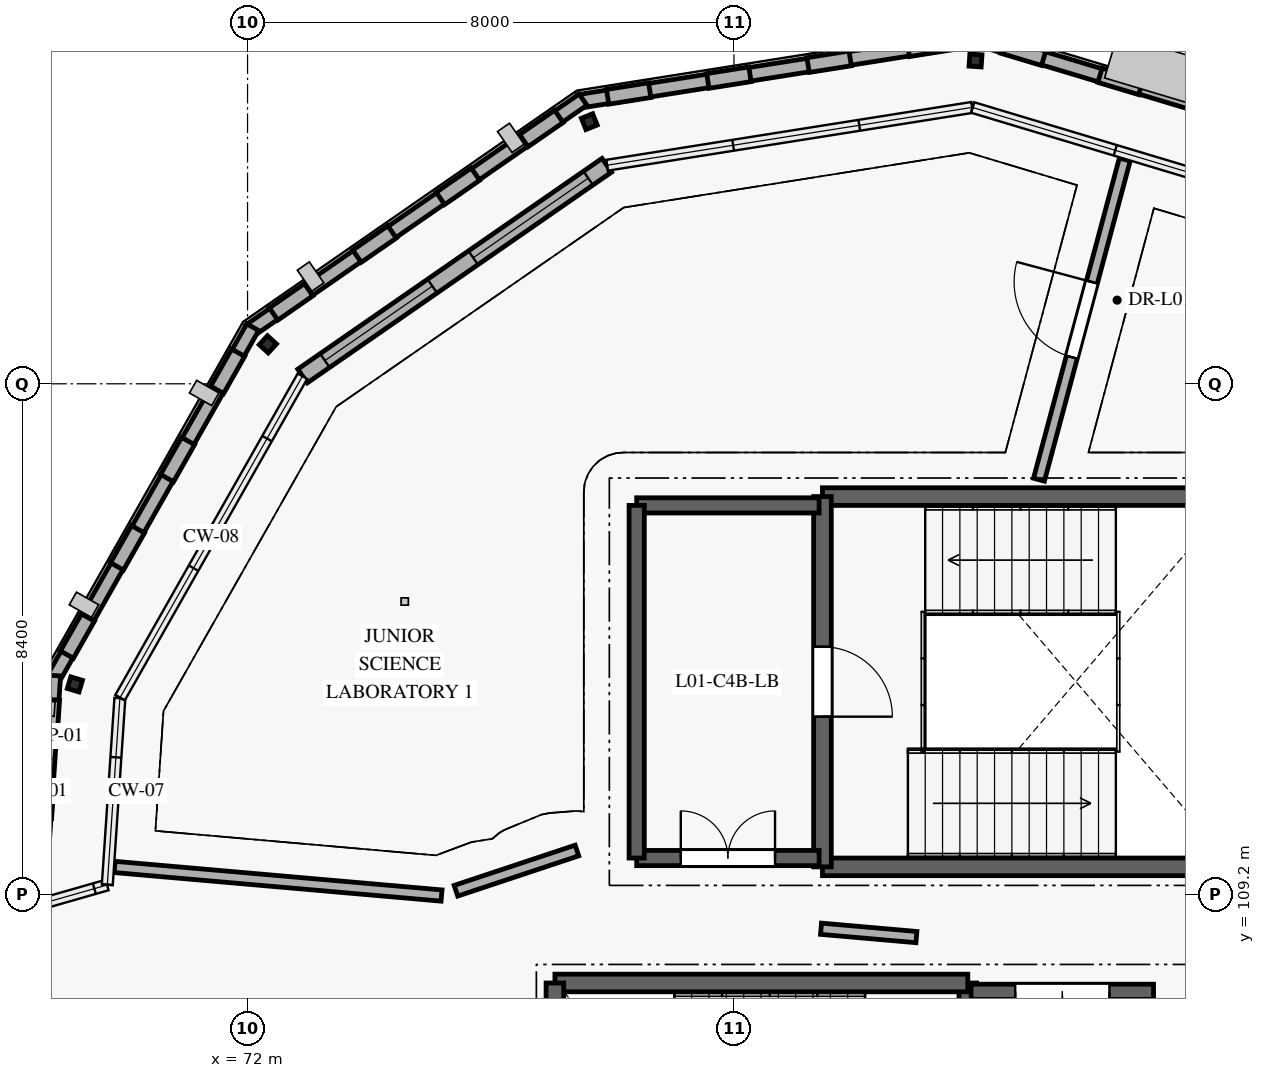
"""IFC4 building model, lengths in metres.
Left out: names, types, materials, properties, quantities, classifications, styles, units other than length and angle.
Written with IfcOpenShell. Run it as: python <this file> out.ifc"""

import sys

from ifc_helpers import new_model, si_unit, direction, frame, frame_2d, origin, origin_2d, place, context, subcontext, project, spatial, rectangle, hollow_rectangle, extrude, element, fill, save


model = new_model("IFC4")
c1 = context("Model", 3, precision=1e-05, world=origin(), true_north=direction((0.0, 1.0)))
c2 = subcontext(c1, "Body", "Model", "MODEL_VIEW")
j1 = project(units=[si_unit("LENGTHUNIT", "METRE"), si_unit("PLANEANGLEUNIT", "RADIAN")], contexts=[c1])
p1 = place(None, origin())
s1 = spatial("IfcSite", under=j1, at=p1, CompositionType="ELEMENT")
p2 = place(p1, origin())
s2 = spatial("IfcBuilding", under=s1, at=p2, CompositionType="ELEMENT")
p3 = place(p2, frame((0.0, 0.0, 4.2)))
s3 = spatial("IfcBuildingStorey", under=s2, at=p3, CompositionType="ELEMENT", Elevation=4.2)
for number, where, z_axis, x_axis in (
    (1, (83.972, 122.917, 0.0), (0.0, 0.0, 1.0), (-0.998, 0.067, 0.0)),
    (2, (77.62, 121.911, 0.0), (0.0, 0.0, 1.0), (-0.928, -0.372, 0.0)),
    (3, (72.334, 118.249, 0.0), (0.0, 0.0, 1.0), (-0.675, -0.738, 0.0)),
    (4, (69.16, 112.656, 0.0), (0.0, 0.0, 1.0), (-0.288, -0.958, 0.0)),
):
    element("IfcColumn", number, at=place(p3, frame(where, z_axis=z_axis, x_axis=x_axis)), inside=s3, PredefinedType="COLUMN", context=c2, shape_type="SweptSolid", body=[
        extrude(hollow_rectangle(XDim=0.2, YDim=0.2, WallThickness=0.012, InnerFilletRadius=0.012, OuterFilletRadius=0.019, at=origin_2d()), origin(), (0.0, 0.0, 1.0), 4.2),
    ])
p4 = place(p3, frame((72.905, 117.728, 0.0), z_axis=(0.0, 0.0, 1.0), x_axis=(0.821994314634, 0.569495695075, 0.0)))
e5 = element("IfcWall", 5, at=p4, inside=s3, PredefinedType="SOLIDWALL", context=c2, shape_type="SweptSolid", body=[
    extrude(rectangle(XDim=6.087, YDim=0.275, at=frame_2d((3.043, 0.0))), origin(), (0.0, 0.0, 1.0), 3.94),
])
p5 = place(p4, frame((0.447, 0.0, 0.85)))
e6 = element("IfcOpeningElement", 6, at=p5, cuts=e5, PredefinedType="OPENING", context=c2, shape_type="SweptSolid", body=[
    extrude(rectangle(XDim=2.15, YDim=1.4, at=frame_2d((1.075, 0.7))), frame((0.0, 0.147, 0.0), z_axis=(0.0, -1.0, 0.0), x_axis=(1.0, 0.0, 0.0)), (0.0, 0.0, 1.0), 0.295),
])
p6 = place(p4, frame((3.415, 0.0, 0.85)))
e7 = element("IfcOpeningElement", 7, at=p6, cuts=e5, PredefinedType="OPENING", context=c2, shape_type="SweptSolid", body=[
    extrude(rectangle(XDim=2.3, YDim=1.4, at=frame_2d((1.15, 0.7))), frame((0.0, 0.147, 0.0), z_axis=(0.0, -1.0, 0.0), x_axis=(1.0, 0.0, 0.0)), (0.0, 0.0, 1.0), 0.295),
])
p7 = place(p3, frame((90.351, 121.374, 0.0), z_axis=(0.0, 0.0, 1.0), x_axis=(-0.957749751871, 0.287602873404, 0.0)))
e8 = element("IfcWall", 8, at=p7, inside=s3, PredefinedType="ELEMENTEDWALL", context=c2, shape_type="SweptSolid", body=[
    extrude(rectangle(XDim=6.676, YDim=0.225, at=frame_2d((3.338, 0.0))), origin(), (0.0, 0.0, 1.0), 1.09),
])
for number, where, z_axis, x_axis in (
    (9, (86.69, 122.473, 1.09), (0.0, 0.0, 1.0), (-0.958, 0.287, 0.0)),
    (10, (85.092, 122.953, 1.09), (0.0, 0.0, 1.0), (-0.958, 0.287, 0.0)),
):
    element("IfcWall", number, at=place(p3, frame(where, z_axis=z_axis, x_axis=x_axis)), inside=s3, PredefinedType="ELEMENTEDWALL", context=c2, shape_type="SweptSolid", body=[
        extrude(rectangle(XDim=0.701, YDim=0.245, at=frame_2d((0.351, 0.0))), origin(), (0.0, 0.0, 1.0), 2.85),
    ])
p8 = place(p3, frame((84.037, 123.288, 0.0), z_axis=(0.0, 0.0, 1.0), x_axis=(-0.987690206406, -0.156422684322, 0.0)))
e11 = element("IfcWall", 11, at=p8, inside=s3, PredefinedType="ELEMENTEDWALL", context=c2, shape_type="SweptSolid", body=[
    extrude(rectangle(XDim=6.676, YDim=0.225, at=frame_2d((3.338, 0.0))), origin(), (0.0, 0.0, 1.0), 1.09),
])
for number, where, z_axis, x_axis in (
    (12, (83.559, 123.212, 1.09), (0.0, 0.0, 1.0), (-0.988, -0.156, 0.0)),
    (13, (81.911, 122.951, 1.09), (0.0, 0.0, 1.0), (-0.988, -0.156, 0.0)),
    (14, (80.262, 122.69, 1.09), (0.0, 0.0, 1.0), (-0.988, -0.156, 0.0)),
    (15, (78.614, 122.429, 1.09), (0.0, 0.0, 1.0), (-0.988, -0.156, 0.0)),
):
    element("IfcWall", number, at=place(p3, frame(where, z_axis=z_axis, x_axis=x_axis)), inside=s3, PredefinedType="ELEMENTEDWALL", context=c2, shape_type="SweptSolid", body=[
        extrude(rectangle(XDim=0.701, YDim=0.245, at=frame_2d((0.351, 0.0))), origin(), (0.0, 0.0, 1.0), 2.85),
    ])
p9 = place(p3, frame((77.518, 122.274, 0.0), z_axis=(0.0, 0.0, 1.0), x_axis=(-0.822009139105, -0.56947429725, 0.0)))
e16 = element("IfcWall", 16, at=p9, inside=s3, PredefinedType="ELEMENTEDWALL", context=c2, shape_type="SweptSolid", body=[
    extrude(rectangle(XDim=6.676, YDim=0.225, at=frame_2d((3.338, 0.0))), origin(), (0.0, 0.0, 1.0), 1.09),
])
for number, where, z_axis, x_axis in (
    (17, (77.12, 121.998, 1.09), (0.0, 0.0, 1.0), (-0.822, -0.569, 0.0)),
    (18, (75.748, 121.048, 1.09), (0.0, 0.0, 1.0), (-0.822, -0.569, 0.0)),
):
    element("IfcWall", number, at=place(p3, frame(where, z_axis=z_axis, x_axis=x_axis)), inside=s3, PredefinedType="ELEMENTEDWALL", context=c2, shape_type="SweptSolid", body=[
        extrude(rectangle(XDim=0.701, YDim=0.245, at=frame_2d((0.351, 0.0))), origin(), (0.0, 0.0, 1.0), 2.85),
    ])
p10 = place(p3, frame((74.377, 120.097, 1.09), z_axis=(0.0, 0.0, 1.0), x_axis=(-0.821953993254, -0.569553889438, 0.0)))
e19 = element("IfcWall", 19, at=p10, inside=s3, PredefinedType="ELEMENTEDWALL", context=c2, shape_type="SweptSolid", body=[
    extrude(rectangle(XDim=0.701, YDim=0.245, at=frame_2d((0.351, 0.0))), origin(), (0.0, 0.0, 1.0), 2.85),
])
p11 = place(p3, frame((73.005, 119.147, 1.09), z_axis=(0.0, 0.0, 1.0), x_axis=(-0.822004061083, -0.569481627064, 0.0)))
e20 = element("IfcWall", 20, at=p11, inside=s3, PredefinedType="ELEMENTEDWALL", context=c2, shape_type="SweptSolid", body=[
    extrude(rectangle(XDim=0.701, YDim=0.245, at=frame_2d((0.351, 0.0))), origin(), (0.0, 0.0, 1.0), 2.85),
])
p12 = place(p3, frame((72.085, 118.531, 0.0), z_axis=(0.0, 0.0, 1.0), x_axis=(-0.493497861667, -0.869747009498, 0.0)))
e21 = element("IfcWall", 21, at=p12, inside=s3, PredefinedType="ELEMENTEDWALL", context=c2, shape_type="SweptSolid", body=[
    extrude(rectangle(XDim=6.676, YDim=0.225, at=frame_2d((3.338, 0.0))), origin(), (0.0, 0.0, 1.0), 1.09),
])
for number, where, z_axis, x_axis in (
    (22, (71.846, 118.11, 1.09), (0.0, 0.0, 1.0), (-0.494, -0.87, 0.0)),
    (23, (71.022, 116.659, 1.09), (0.0, 0.0, 1.0), (-0.493, -0.87, 0.0)),
    (24, (70.199, 115.207, 1.09), (0.0, 0.0, 1.0), (-0.494, -0.87, 0.0)),
):
    element("IfcWall", number, at=place(p3, frame(where, z_axis=z_axis, x_axis=x_axis)), inside=s3, PredefinedType="ELEMENTEDWALL", context=c2, shape_type="SweptSolid", body=[
        extrude(rectangle(XDim=0.701, YDim=0.245, at=frame_2d((0.351, 0.0))), origin(), (0.0, 0.0, 1.0), 2.85),
    ])
p13 = place(p3, frame((69.375, 113.756, 1.09), z_axis=(0.0, 0.0, 1.0), x_axis=(-0.49339908657, -0.869803047461, 0.0)))
e25 = element("IfcWall", 25, at=p13, inside=s3, PredefinedType="ELEMENTEDWALL", context=c2, shape_type="SweptSolid", body=[
    extrude(rectangle(XDim=0.701, YDim=0.245, at=frame_2d((0.351, 0.0))), origin(), (0.0, 0.0, 1.0), 2.85),
])
p14 = place(p3, frame((68.813, 112.802, 0.0), z_axis=(0.0, 0.0, 1.0), x_axis=(-0.067209356194, -0.997738894922, 0.0)))
e26 = element("IfcWall", 26, at=p14, inside=s3, PredefinedType="ELEMENTEDWALL", context=c2, shape_type="SweptSolid", body=[
    extrude(rectangle(XDim=2.746, YDim=0.225, at=frame_2d((1.373, 0.0))), origin(), (0.0, 0.0, 1.0), 1.09),
])
p15 = place(p3, frame((68.787, 112.405, 1.09), z_axis=(0.0, 0.0, 1.0), x_axis=(-0.067277250526, -0.997734319126, 0.0)))
e27 = element("IfcWall", 27, at=p15, inside=s3, PredefinedType="ELEMENTEDWALL", context=c2, shape_type="SweptSolid", body=[
    extrude(rectangle(XDim=0.577, YDim=0.245, at=frame_2d((0.289, 0.0))), origin(), (0.0, 0.0, 1.0), 2.85),
])
p16 = place(p3, frame((68.694, 111.035, 1.09), z_axis=(0.0, 0.0, 1.0), x_axis=(-0.066827806151, -0.997764523485, 0.0)))
e28 = element("IfcWall", 28, at=p16, inside=s3, PredefinedType="ELEMENTEDWALL", context=c2, shape_type="SweptSolid", body=[
    extrude(rectangle(XDim=0.577, YDim=0.245, at=frame_2d((0.289, 0.0))), origin(), (0.0, 0.0, 1.0), 2.85),
])
p17 = place(p3, frame((83.845, 101.655, 0.0), z_axis=(0.0, 0.0, 1.0), x_axis=(0.0, 1.0, 0.0)))
e29 = element("IfcWall", 29, at=p17, inside=s3, PredefinedType="SHEAR", context=c2, shape_type="SweptSolid", body=[
    extrude(rectangle(XDim=6.09, YDim=0.29, at=frame_2d((3.045, 0.0))), origin(), (0.0, 0.0, 1.0), 3.95),
])
p18 = place(p17, frame((2.47, 0.0, 0.0)))
e30 = element("IfcOpeningElement", 30, at=p18, cuts=e29, PredefinedType="OPENING", context=c2, shape_type="SweptSolid", body=[
    extrude(rectangle(XDim=1.15, YDim=2.1, at=frame_2d((0.575, 1.05))), frame((0.0, 0.155, 0.0), z_axis=(0.0, -1.0, 0.0), x_axis=(1.0, 0.0, 0.0)), (0.0, 0.0, 1.0), 0.31),
])
p19 = place(p3, frame((83.845, 107.745, 0.0), z_axis=(0.0, 0.0, 1.0), x_axis=(-1.0, 0.0, 0.0)))
e31 = element("IfcWall", 31, at=p19, inside=s3, PredefinedType="SHEAR", context=c2, shape_type="SweptSolid", body=[
    extrude(rectangle(XDim=6.79, YDim=0.29, at=frame_2d((3.395, 0.0))), origin(), (0.0, 0.0, 1.0), 3.95),
])
p20 = place(p3, frame((77.055, 107.745, 0.0), z_axis=(0.0, 0.0, 1.0), x_axis=(0.0, -1.0, 0.0)))
e32 = element("IfcWall", 32, at=p20, inside=s3, PredefinedType="SHEAR", context=c2, shape_type="SweptSolid", body=[
    extrude(rectangle(XDim=6.09, YDim=0.29, at=frame_2d((3.045, 0.0))), origin(), (0.0, 0.0, 1.0), 3.95),
])
p21 = place(p3, frame((86.9, 107.6, 0.0), z_axis=(0.0, 0.0, 1.0), x_axis=(-1.0, 0.0, 0.0)))
e33 = element("IfcWall", 33, at=p21, inside=s3, PredefinedType="SHEAR", context=c2, shape_type="SweptSolid", body=[
    extrude(rectangle(XDim=3.0, YDim=0.25, at=frame_2d((1.5, 0.0))), origin(), (0.0, 0.0, 1.0), 3.95),
])
p22 = place(p21, frame((0.725, 0.0, 0.0)))
e34 = element("IfcOpeningElement", 34, at=p22, cuts=e33, PredefinedType="OPENING", context=c2, shape_type="SweptSolid", body=[
    extrude(rectangle(XDim=1.55, YDim=2.15, at=frame_2d((0.775, 1.075))), frame((0.0, 0.135, 0.0), z_axis=(0.0, -1.0, 0.0), x_axis=(1.0, 0.0, 0.0)), (0.0, 0.0, 1.0), 0.27),
])
for number, where, z_axis, x_axis in (
    (35, (81.455, 109.655, 0.0), (0.0, 0.0, 1.0), (1.0, 0.0, 0.0)),
    (36, (88.245, 115.745, 0.0), (0.0, 0.0, 1.0), (-1.0, 0.0, 0.0)),
):
    element("IfcWall", number, at=place(p3, frame(where, z_axis=z_axis, x_axis=x_axis)), inside=s3, PredefinedType="SHEAR", context=c2, shape_type="SweptSolid", body=[
        extrude(rectangle(XDim=6.79, YDim=0.29, at=frame_2d((3.395, 0.0))), origin(), (0.0, 0.0, 1.0), 3.95),
    ])
p23 = place(p3, frame((81.455, 115.745, 0.0), z_axis=(0.0, 0.0, 1.0), x_axis=(0.0, -1.0, 0.0)))
e37 = element("IfcWall", 37, at=p23, inside=s3, PredefinedType="SHEAR", context=c2, shape_type="SweptSolid", body=[
    extrude(rectangle(XDim=6.09, YDim=0.29, at=frame_2d((3.045, 0.0))), origin(), (0.0, 0.0, 1.0), 3.95),
])
p24 = place(p23, frame((2.47, 0.0, 0.0)))
e38 = element("IfcOpeningElement", 38, at=p24, cuts=e37, PredefinedType="OPENING", context=c2, shape_type="SweptSolid", body=[
    extrude(rectangle(XDim=1.15, YDim=2.1, at=frame_2d((0.575, 1.05))), frame((0.0, 0.155, 0.0), z_axis=(0.0, -1.0, 0.0), x_axis=(1.0, 0.0, 0.0)), (0.0, 0.0, 1.0), 0.31),
])
p25 = place(p3, frame((78.4, 109.8, 0.0), z_axis=(0.0, 0.0, 1.0), x_axis=(1.0, 0.0, 0.0)))
e39 = element("IfcWall", 39, at=p25, inside=s3, PredefinedType="SHEAR", context=c2, shape_type="SweptSolid", body=[
    extrude(rectangle(XDim=3.0, YDim=0.25, at=frame_2d((1.5, 0.0))), origin(), (0.0, 0.0, 1.0), 3.95),
])
p26 = place(p25, frame((0.725, 0.0, 0.0)))
e40 = element("IfcOpeningElement", 40, at=p26, cuts=e39, PredefinedType="OPENING", context=c2, shape_type="SweptSolid", body=[
    extrude(rectangle(XDim=1.55, YDim=2.15, at=frame_2d((0.775, 1.075))), frame((0.0, 0.135, 0.0), z_axis=(0.0, -1.0, 0.0), x_axis=(1.0, 0.0, 0.0)), (0.0, 0.0, 1.0), 0.27),
])
p27 = place(p3, frame((81.4, 115.6, 0.0), z_axis=(0.0, 0.0, 1.0), x_axis=(-1.0, 0.0, 0.0)))
e41 = element("IfcWall", 41, at=p27, inside=s3, PredefinedType="SHEAR", context=c2, shape_type="SweptSolid", body=[
    extrude(rectangle(XDim=3.0, YDim=0.25, at=frame_2d((1.5, 0.0))), origin(), (0.0, 0.0, 1.0), 3.95),
])
p28 = place(p3, frame((78.4, 115.6, 0.0), z_axis=(0.0, 0.0, 1.0), x_axis=(0.0, -1.0, 0.0)))
e42 = element("IfcWall", 42, at=p28, inside=s3, PredefinedType="SHEAR", context=c2, shape_type="SweptSolid", body=[
    extrude(rectangle(XDim=5.8, YDim=0.25, at=frame_2d((2.9, 0.0))), origin(), (0.0, 0.0, 1.0), 3.95),
])
p29 = place(p3, frame((81.431, 108.637, 0.0), z_axis=(0.0, 0.0, 1.0), x_axis=(0.996196241539, -0.08713809926, 0.0)))
e43 = element("IfcWall", 43, at=p29, inside=s3, PredefinedType="PARTITIONING", context=c2, shape_type="SweptSolid", body=[
    extrude(rectangle(XDim=1.575, YDim=0.185, at=frame_2d((0.787, 0.0))), origin(), (0.0, 0.0, 1.0), 3.93),
])
p30 = place(p3, frame((85.016, 116.022, 0.0), z_axis=(0.0, 0.0, 1.0), x_axis=(0.25882188484, 0.965925065379, 0.0)))
e44 = element("IfcWall", 44, at=p30, inside=s3, PredefinedType="PARTITIONING", context=c2, shape_type="SweptSolid", body=[
    extrude(rectangle(XDim=5.452, YDim=0.185, at=frame_2d((2.726, 0.0))), origin(), (0.0, 0.0, 1.0), 3.93),
])
p31 = place(p30, frame((2.086, 0.0, 0.0)))
e45 = element("IfcOpeningElement", 45, at=p31, cuts=e44, PredefinedType="OPENING", context=c2, shape_type="SweptSolid", body=[
    extrude(rectangle(XDim=1.28, YDim=2.14, at=frame_2d((0.64, 1.07))), frame((0.0, 0.103, 0.0), z_axis=(0.0, -1.0, 0.0), x_axis=(1.0, 0.0, 0.0)), (0.0, 0.0, 1.0), 0.205),
])
p32 = place(p3, frame((69.814, 109.654, 0.0), z_axis=(0.0, 0.0, 1.0), x_axis=(0.996193422883, -0.087170317223, 0.0)))
e46 = element("IfcWall", 46, at=p32, inside=s3, PredefinedType="PARTITIONING", context=c2, shape_type="SweptSolid", body=[
    extrude(rectangle(XDim=5.397, YDim=0.185, at=frame_2d((2.698, 0.0))), origin(), (0.0, 0.0, 1.0), 3.93),
])
p33 = place(p3, frame((75.427, 109.262, 0.0), z_axis=(0.0, 0.0, 1.0), x_axis=(0.948904309967, 0.315563956315, 0.0)))
e47 = element("IfcWall", 47, at=p33, inside=s3, PredefinedType="PARTITIONING", context=c2, shape_type="SweptSolid", body=[
    extrude(rectangle(XDim=2.097, YDim=0.185, at=frame_2d((1.048, 0.0))), origin(), (0.0, 0.0, 1.0), 3.93),
])
p34 = place(p5, origin())
e48 = element("IfcWindow", 48, at=p34, inside=s3, PartitioningType="SINGLE_PANEL", PredefinedType="WINDOW", context=c2, shape_type="SweptSolid", body=[
    extrude(rectangle(XDim=2.15, YDim=1.4, at=frame_2d((1.075, 0.7))), frame((0.0, 0.03, 0.0), z_axis=(0.0, -1.0, 0.0), x_axis=(1.0, 0.0, 0.0)), (0.0, 0.0, 1.0), 0.06),
])
fill(e6, e48)
p35 = place(p6, origin())
e49 = element("IfcWindow", 49, at=p35, inside=s3, PartitioningType="SINGLE_PANEL", PredefinedType="WINDOW", context=c2, shape_type="SweptSolid", body=[
    extrude(rectangle(XDim=2.3, YDim=1.4, at=frame_2d((1.15, 0.7))), frame((0.0, 0.03, 0.0), z_axis=(0.0, -1.0, 0.0), x_axis=(1.0, 0.0, 0.0)), (0.0, 0.0, 1.0), 0.06),
])
fill(e7, e49)
p36 = place(p22, origin())
e50 = element("IfcDoor", 50, at=p36, inside=s3, OperationType="DOUBLE_DOOR_SINGLE_SWING", PredefinedType="DOOR", context=c2, shape_type="SweptSolid", body=[
    extrude(rectangle(XDim=1.55, YDim=2.15, at=frame_2d((0.775, 1.075))), frame((0.0, 0.025, 0.0), z_axis=(0.0, -1.0, 0.0), x_axis=(1.0, 0.0, 0.0)), (0.0, 0.0, 1.0), 0.05),
])
fill(e34, e50)
p37 = place(p24, origin())
e51 = element("IfcDoor", 51, at=p37, inside=s3, OperationType="SINGLE_SWING_RIGHT", PredefinedType="DOOR", context=c2, shape_type="SweptSolid", body=[
    extrude(rectangle(XDim=1.15, YDim=2.1, at=frame_2d((0.575, 1.05))), frame((0.0, 0.025, 0.0), z_axis=(0.0, -1.0, 0.0), x_axis=(1.0, 0.0, 0.0)), (0.0, 0.0, 1.0), 0.05),
])
fill(e38, e51)
p38 = place(p26, origin())
e52 = element("IfcDoor", 52, at=p38, inside=s3, OperationType="DOUBLE_DOOR_SINGLE_SWING", PredefinedType="DOOR", context=c2, shape_type="SweptSolid", body=[
    extrude(rectangle(XDim=1.55, YDim=2.15, at=frame_2d((0.775, 1.075))), frame((0.0, 0.025, 0.0), z_axis=(0.0, -1.0, 0.0), x_axis=(1.0, 0.0, 0.0)), (0.0, 0.0, 1.0), 0.05),
])
fill(e40, e52)
p39 = place(p31, origin())
e53 = element("IfcDoor", 53, at=p39, inside=s3, OperationType="SINGLE_SWING_RIGHT", PredefinedType="DOOR", context=c2, shape_type="SweptSolid", body=[
    extrude(rectangle(XDim=1.28, YDim=2.14, at=frame_2d((0.64, 1.07))), frame((0.0, 0.025, 0.0), z_axis=(0.0, -1.0, 0.0), x_axis=(1.0, 0.0, 0.0)), (0.0, 0.0, 1.0), 0.05),
])
fill(e45, e53)
save(model, sys.argv[1])
